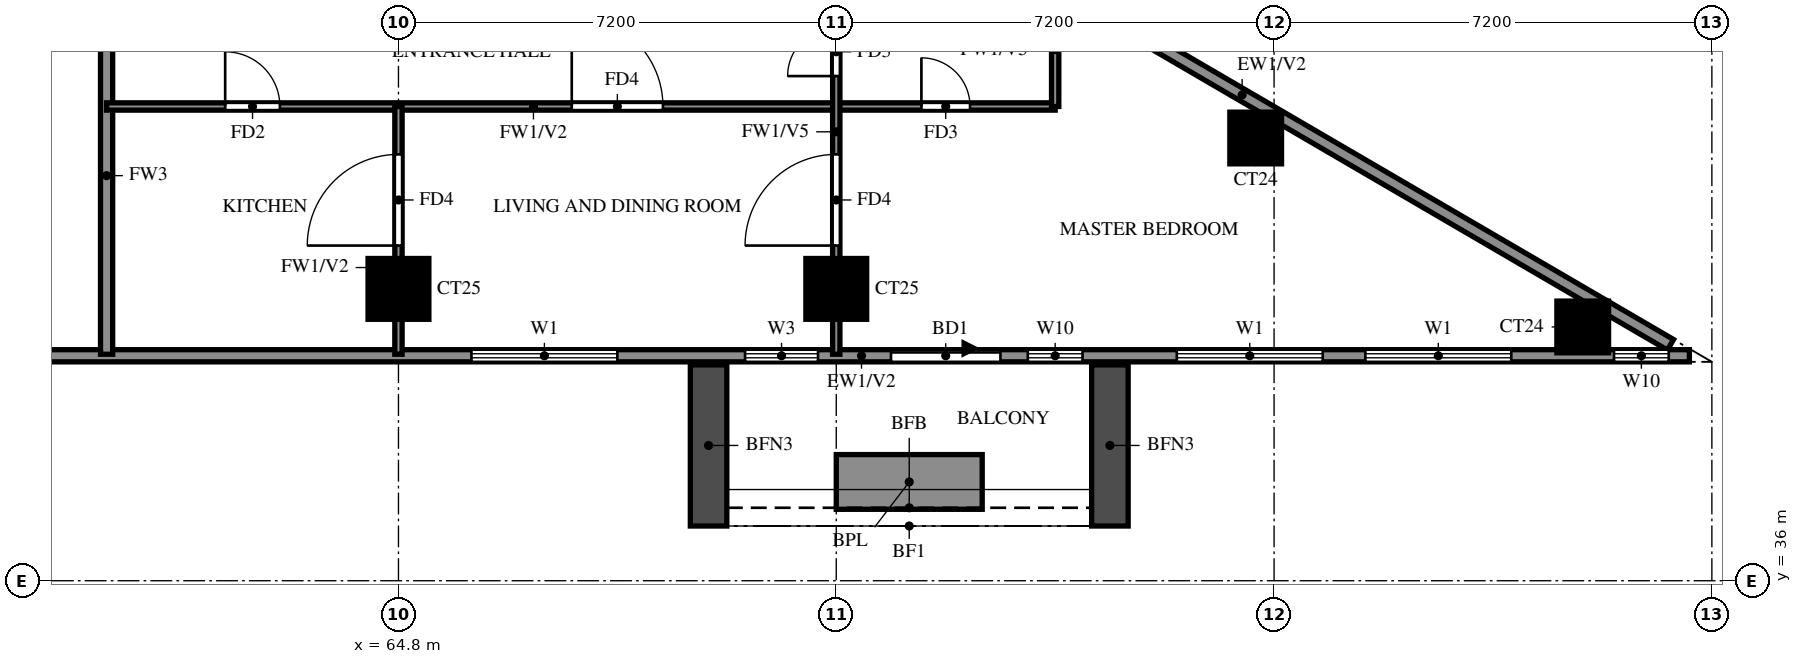
"""IFC4 building model, lengths in metres.
Left out: names, types, materials, properties, quantities, classifications, styles, units other than length and angle.
Written with IfcOpenShell. Run it as: python <this file> out.ifc"""

import sys

from ifc_helpers import new_model, si_unit, direction, frame, frame_2d, origin, origin_2d, place, context, subcontext, project, spatial, rectangle, extrude, source, transform, mapped, element, fill, save


model = new_model("IFC4")
c1 = context("Model", 3, precision=1e-05, world=origin(), true_north=direction((0.0, 1.0)))
c2 = subcontext(c1, "Body", "Model", "MODEL_VIEW")
j1 = project(units=[si_unit("LENGTHUNIT", "METRE"), si_unit("PLANEANGLEUNIT", "RADIAN")], contexts=[c1])
p1 = place(None, origin())
s1 = spatial("IfcSite", under=j1, at=p1, CompositionType="ELEMENT")
p2 = place(p1, origin())
s2 = spatial("IfcBuilding", under=s1, at=p2, CompositionType="ELEMENT")
p3 = place(p2, frame((0.0, 0.0, 146.5)))
s3 = spatial("IfcBuildingStorey", under=s2, at=p3, CompositionType="ELEMENT", Elevation=146.5)
m1 = source(origin(), c2, "Body", "SweptSolid", [
    extrude(rectangle(XDim=0.85, YDim=0.85, at=origin_2d()), origin(), (0.0, 0.0, 1.0), 3.2),
])
p4 = place(p3, frame((84.276, 40.174, 0.0), z_axis=(0.0, 0.0, 1.0), x_axis=(1.0, 0.0, 0.0)))
e1 = element("IfcColumn", 1, at=p4, inside=s3, PredefinedType="COLUMN", context=c2, shape_type="MappedRepresentation", body=[
    mapped(m1, transform((0.0, 0.0, 0.0))),
])
m2 = source(origin(), c2, "Body", "SweptSolid", [
    extrude(rectangle(XDim=1.0, YDim=1.0, at=origin_2d()), origin(), (0.0, 0.0, 1.0), 3.2),
])
for number, where, z_axis, x_axis in (
    (2, (64.8, 40.8, 0.0), (0.0, 0.0, 1.0), (1.0, 0.0, 0.0)),
    (3, (72.0, 40.8, 0.0), (0.0, 0.0, 1.0), (1.0, 0.0, 0.0)),
):
    element("IfcColumn", number, at=place(p3, frame(where, z_axis=z_axis, x_axis=x_axis)), inside=s3, PredefinedType="COLUMN", context=c2, shape_type="MappedRepresentation", body=[
        mapped(m2, transform((0.0, 0.0, 0.0))),
    ])
p5 = place(p3, frame((78.898, 43.282, 0.0), z_axis=(0.0, 0.0, 1.0), x_axis=(1.0, 0.0, 0.0)))
e4 = element("IfcColumn", 4, at=p5, inside=s3, PredefinedType="COLUMN", context=c2, shape_type="MappedRepresentation", body=[
    mapped(m1, transform((0.0, 0.0, 0.0))),
])
p6 = place(p3, frame((85.719, 39.881, 0.0), z_axis=(0.0, 0.0, 1.0), x_axis=(-0.86377618652, 0.503875678716, 0.0)))
e5 = element("IfcWall", 5, at=p6, inside=s3, PredefinedType="SOLIDWALL", context=c2, shape_type="SweptSolid", body=[
    extrude(rectangle(XDim=16.311, YDim=0.2, at=frame_2d((8.156, 0.0))), origin(), (0.0, 0.0, 1.0), 3.2),
])
p7 = place(p6, frame((13.326, 0.0, 1.5)))
e6 = element("IfcOpeningElement", 6, at=p7, cuts=e5, PredefinedType="OPENING", context=c2, shape_type="SweptSolid", body=[
    extrude(rectangle(XDim=0.9, YDim=0.9, at=frame_2d((0.45, 0.45))), frame((0.0, 0.11, 0.0), z_axis=(0.0, -1.0, 0.0), x_axis=(1.0, 0.0, 0.0)), (0.0, 0.0, 1.0), 0.22),
])
p8 = place(p3, frame((58.8, 39.7, 0.0), z_axis=(0.0, 0.0, 1.0), x_axis=(1.0, 0.0, 0.0)))
e7 = element("IfcWall", 7, at=p8, inside=s3, PredefinedType="SOLIDWALL", context=c2, shape_type="SweptSolid", body=[
    extrude(rectangle(XDim=27.23, YDim=0.2, at=frame_2d((13.615, 0.0))), origin(), (0.0, 0.0, 1.0), 3.2),
])
p9 = place(p8, frame((14.1, 0.0, 0.0)))
e8 = element("IfcOpeningElement", 8, at=p9, cuts=e7, PredefinedType="OPENING", context=c2, shape_type="SweptSolid", body=[
    extrude(rectangle(XDim=1.8, YDim=2.4, at=frame_2d((0.9, 1.2))), frame((0.0, 0.11, 0.0), z_axis=(0.0, -1.0, 0.0), x_axis=(1.0, 0.0, 0.0)), (0.0, 0.0, 1.0), 0.22),
])
p10 = place(p8, frame((7.2, 0.0, 0.6)))
e9 = element("IfcOpeningElement", 9, at=p10, cuts=e7, PredefinedType="OPENING", context=c2, shape_type="SweptSolid", body=[
    extrude(rectangle(XDim=2.4, YDim=2.4, at=frame_2d((1.2, 1.2))), frame((0.0, 0.11, 0.0), z_axis=(0.0, -1.0, 0.0), x_axis=(1.0, 0.0, 0.0)), (0.0, 0.0, 1.0), 0.22),
])
p11 = place(p8, frame((11.7, 0.0, 0.6)))
e10 = element("IfcOpeningElement", 10, at=p11, cuts=e7, PredefinedType="OPENING", context=c2, shape_type="SweptSolid", body=[
    extrude(rectangle(XDim=1.2, YDim=2.4, at=frame_2d((0.6, 1.2))), frame((0.0, 0.11, 0.0), z_axis=(0.0, -1.0, 0.0), x_axis=(1.0, 0.0, 0.0)), (0.0, 0.0, 1.0), 0.22),
])
p12 = place(p8, frame((16.35, 0.0, 0.6)))
e11 = element("IfcOpeningElement", 11, at=p12, cuts=e7, PredefinedType="OPENING", context=c2, shape_type="SweptSolid", body=[
    extrude(rectangle(XDim=0.9, YDim=2.4, at=frame_2d((0.45, 1.2))), frame((0.0, 0.11, 0.0), z_axis=(0.0, -1.0, 0.0), x_axis=(1.0, 0.0, 0.0)), (0.0, 0.0, 1.0), 0.22),
])
p13 = place(p8, frame((18.8, 0.0, 0.6)))
e12 = element("IfcOpeningElement", 12, at=p13, cuts=e7, PredefinedType="OPENING", context=c2, shape_type="SweptSolid", body=[
    extrude(rectangle(XDim=2.4, YDim=2.4, at=frame_2d((1.2, 1.2))), frame((0.0, 0.11, 0.0), z_axis=(0.0, -1.0, 0.0), x_axis=(1.0, 0.0, 0.0)), (0.0, 0.0, 1.0), 0.22),
])
p14 = place(p8, frame((21.901, 0.0, 0.6)))
e13 = element("IfcOpeningElement", 13, at=p14, cuts=e7, PredefinedType="OPENING", context=c2, shape_type="SweptSolid", body=[
    extrude(rectangle(XDim=2.4, YDim=2.4, at=frame_2d((1.2, 1.2))), frame((0.0, 0.11, 0.0), z_axis=(0.0, -1.0, 0.0), x_axis=(1.0, 0.0, 0.0)), (0.0, 0.0, 1.0), 0.22),
])
p15 = place(p8, frame((25.99, 0.0, 0.6)))
e14 = element("IfcOpeningElement", 14, at=p15, cuts=e7, PredefinedType="OPENING", context=c2, shape_type="SweptSolid", body=[
    extrude(rectangle(XDim=0.9, YDim=2.4, at=frame_2d((0.45, 1.2))), frame((0.0, 0.11, 0.0), z_axis=(0.0, -1.0, 0.0), x_axis=(1.0, 0.0, 0.0)), (0.0, 0.0, 1.0), 0.22),
])
for number, where, z_axis, x_axis in (
    (15, (69.9, 39.55, 0.0), (0.0, 0.0, 1.0), (0.0, -1.0, 0.0)),
    (16, (76.5, 39.55, 0.0), (0.0, 0.0, 1.0), (0.0, -1.0, 0.0)),
):
    element("IfcWall", number, at=place(p3, frame(where, z_axis=z_axis, x_axis=x_axis)), inside=s3, PredefinedType="SOLIDWALL", context=c2, shape_type="SweptSolid", body=[
        extrude(rectangle(XDim=2.65, YDim=0.6, at=frame_2d((1.325, 0.0))), origin(), (0.0, 0.0, 1.0), 2.85),
    ])
p16 = place(p3, frame((72.0, 37.625, 0.0), z_axis=(0.0, 0.0, 1.0), x_axis=(1.0, 0.0, 0.0)))
e17 = element("IfcWall", 17, at=p16, inside=s3, PredefinedType="SOLIDWALL", context=c2, shape_type="SweptSolid", body=[
    extrude(rectangle(XDim=2.4, YDim=0.9, at=frame_2d((1.2, 0.0))), origin(), (0.0, 0.0, 1.0), 0.9),
])
p17 = place(p3, frame((60.0, 39.725, 0.0), z_axis=(0.0, 0.0, 1.0), x_axis=(0.0, 1.0, 0.0)))
e18 = element("IfcWall", 18, at=p17, inside=s3, PredefinedType="SOLIDWALL", context=c2, shape_type="SweptSolid", body=[
    extrude(rectangle(XDim=5.875, YDim=0.2, at=frame_2d((2.938, 0.0))), origin(), (0.0, 0.0, 1.0), 3.2),
])
p18 = place(p3, frame((60.0, 43.8, 0.0), z_axis=(0.0, 0.0, 1.0), x_axis=(1.0, 0.0, 0.0)))
e19 = element("IfcWall", 19, at=p18, inside=s3, PredefinedType="PARTITIONING", context=c2, shape_type="SweptSolid", body=[
    extrude(rectangle(XDim=15.6, YDim=0.12, at=frame_2d((7.8, 0.0))), origin(), (0.0, 0.0, 1.0), 3.2),
])
p19 = place(p18, frame((7.65, 0.0, 0.0)))
e20 = element("IfcOpeningElement", 20, at=p19, cuts=e19, PredefinedType="OPENING", context=c2, shape_type="SweptSolid", body=[
    extrude(rectangle(XDim=1.5, YDim=2.1, at=frame_2d((0.75, 1.05))), frame((0.0, 0.07, 0.0), z_axis=(0.0, -1.0, 0.0), x_axis=(1.0, 0.0, 0.0)), (0.0, 0.0, 1.0), 0.14),
])
p20 = place(p18, frame((1.95, 0.0, 0.0)))
e21 = element("IfcOpeningElement", 21, at=p20, cuts=e19, PredefinedType="OPENING", context=c2, shape_type="SweptSolid", body=[
    extrude(rectangle(XDim=0.9, YDim=2.1, at=frame_2d((0.45, 1.05))), frame((0.0, 0.07, 0.0), z_axis=(0.0, -1.0, 0.0), x_axis=(1.0, 0.0, 0.0)), (0.0, 0.0, 1.0), 0.14),
])
p21 = place(p18, frame((13.4, 0.0, 0.0)))
e22 = element("IfcOpeningElement", 22, at=p21, cuts=e19, PredefinedType="OPENING", context=c2, shape_type="SweptSolid", body=[
    extrude(rectangle(XDim=0.8, YDim=2.1, at=frame_2d((0.4, 1.05))), frame((0.0, 0.07, 0.0), z_axis=(0.0, -1.0, 0.0), x_axis=(1.0, 0.0, 0.0)), (0.0, 0.0, 1.0), 0.14),
])
p22 = place(p3, frame((64.8, 39.725, 0.0), z_axis=(0.0, 0.0, 1.0), x_axis=(0.0, 1.0, 0.0)))
e23 = element("IfcWall", 23, at=p22, inside=s3, PredefinedType="PARTITIONING", context=c2, shape_type="SweptSolid", body=[
    extrude(rectangle(XDim=4.075, YDim=0.12, at=frame_2d((2.038, 0.0))), origin(), (0.0, 0.0, 1.0), 3.2),
])
p23 = place(p22, frame((1.788, 0.0, 0.0)))
e24 = element("IfcOpeningElement", 24, at=p23, cuts=e23, PredefinedType="OPENING", context=c2, shape_type="SweptSolid", body=[
    extrude(rectangle(XDim=1.5, YDim=2.1, at=frame_2d((0.75, 1.05))), frame((0.0, 0.07, 0.0), z_axis=(0.0, -1.0, 0.0), x_axis=(1.0, 0.0, 0.0)), (0.0, 0.0, 1.0), 0.14),
])
p24 = place(p3, frame((72.0, 39.725, 0.0), z_axis=(0.0, 0.0, 1.0), x_axis=(0.0, 1.0, 0.0)))
e25 = element("IfcWall", 25, at=p24, inside=s3, PredefinedType="PARTITIONING", context=c2, shape_type="SweptSolid", body=[
    extrude(rectangle(XDim=8.13, YDim=0.12, at=frame_2d((4.065, 0.0))), origin(), (0.0, 0.0, 1.0), 2.3),
])
p25 = place(p24, frame((1.788, 0.0, 0.0)))
e26 = element("IfcOpeningElement", 26, at=p25, cuts=e25, PredefinedType="OPENING", context=c2, shape_type="SweptSolid", body=[
    extrude(rectangle(XDim=1.5, YDim=2.1, at=frame_2d((0.75, 1.05))), frame((0.0, 0.07, 0.0), z_axis=(0.0, -1.0, 0.0), x_axis=(1.0, 0.0, 0.0)), (0.0, 0.0, 1.0), 0.14),
])
p26 = place(p24, frame((4.575, 0.0, 0.0)))
e27 = element("IfcOpeningElement", 27, at=p26, cuts=e25, PredefinedType="OPENING", context=c2, shape_type="SweptSolid", body=[
    extrude(rectangle(XDim=0.8, YDim=2.1, at=frame_2d((0.4, 1.05))), frame((0.0, 0.07, 0.0), z_axis=(0.0, -1.0, 0.0), x_axis=(1.0, 0.0, 0.0)), (0.0, 0.0, 1.0), 0.14),
])
p27 = place(p3, frame((75.6, 43.8, 0.0), z_axis=(0.0, 0.0, 1.0), x_axis=(0.0, 1.0, 0.0)))
e28 = element("IfcWall", 28, at=p27, inside=s3, PredefinedType="PARTITIONING", context=c2, shape_type="SweptSolid", body=[
    extrude(rectangle(XDim=1.868, YDim=0.12, at=frame_2d((0.934, 0.0))), origin(), (0.0, 0.0, 1.0), 2.3),
])
p28 = place(p9, origin())
e29 = element("IfcDoor", 29, at=p28, inside=s3, OperationType="DOUBLE_DOOR_SLIDING", PredefinedType="DOOR", context=c2, shape_type="SweptSolid", body=[
    extrude(rectangle(XDim=1.8, YDim=2.4, at=frame_2d((0.9, 1.2))), frame((0.0, 0.025, 0.0), z_axis=(0.0, -1.0, 0.0), x_axis=(1.0, 0.0, 0.0)), (0.0, 0.0, 1.0), 0.05),
])
fill(e8, e29)
p29 = place(p10, origin())
e30 = element("IfcWindow", 30, at=p29, inside=s3, PartitioningType="DOUBLE_PANEL_VERTICAL", PredefinedType="WINDOW", context=c2, shape_type="SweptSolid", body=[
    extrude(rectangle(XDim=2.4, YDim=2.4, at=frame_2d((1.2, 1.2))), frame((0.0, 0.03, 0.0), z_axis=(0.0, -1.0, 0.0), x_axis=(1.0, 0.0, 0.0)), (0.0, 0.0, 1.0), 0.06),
])
fill(e9, e30)
p30 = place(p11, origin())
e31 = element("IfcWindow", 31, at=p30, inside=s3, PartitioningType="SINGLE_PANEL", PredefinedType="WINDOW", context=c2, shape_type="SweptSolid", body=[
    extrude(rectangle(XDim=1.2, YDim=2.4, at=frame_2d((0.6, 1.2))), frame((0.0, 0.03, 0.0), z_axis=(0.0, -1.0, 0.0), x_axis=(1.0, 0.0, 0.0)), (0.0, 0.0, 1.0), 0.06),
])
fill(e10, e31)
p31 = place(p12, origin())
e32 = element("IfcWindow", 32, at=p31, inside=s3, PartitioningType="SINGLE_PANEL", PredefinedType="WINDOW", context=c2, shape_type="SweptSolid", body=[
    extrude(rectangle(XDim=0.9, YDim=2.4, at=frame_2d((0.45, 1.2))), frame((0.0, 0.03, 0.0), z_axis=(0.0, -1.0, 0.0), x_axis=(1.0, 0.0, 0.0)), (0.0, 0.0, 1.0), 0.06),
])
fill(e11, e32)
p32 = place(p13, origin())
e33 = element("IfcWindow", 33, at=p32, inside=s3, PartitioningType="DOUBLE_PANEL_VERTICAL", PredefinedType="WINDOW", context=c2, shape_type="SweptSolid", body=[
    extrude(rectangle(XDim=2.4, YDim=2.4, at=frame_2d((1.2, 1.2))), frame((0.0, 0.03, 0.0), z_axis=(0.0, -1.0, 0.0), x_axis=(1.0, 0.0, 0.0)), (0.0, 0.0, 1.0), 0.06),
])
fill(e12, e33)
p33 = place(p14, origin())
e34 = element("IfcWindow", 34, at=p33, inside=s3, PartitioningType="DOUBLE_PANEL_VERTICAL", PredefinedType="WINDOW", context=c2, shape_type="SweptSolid", body=[
    extrude(rectangle(XDim=2.4, YDim=2.4, at=frame_2d((1.2, 1.2))), frame((0.0, 0.03, 0.0), z_axis=(0.0, -1.0, 0.0), x_axis=(1.0, 0.0, 0.0)), (0.0, 0.0, 1.0), 0.06),
])
fill(e13, e34)
p34 = place(p15, origin())
e35 = element("IfcWindow", 35, at=p34, inside=s3, PartitioningType="SINGLE_PANEL", PredefinedType="WINDOW", context=c2, shape_type="SweptSolid", body=[
    extrude(rectangle(XDim=0.9, YDim=2.4, at=frame_2d((0.45, 1.2))), frame((0.0, 0.03, 0.0), z_axis=(0.0, -1.0, 0.0), x_axis=(1.0, 0.0, 0.0)), (0.0, 0.0, 1.0), 0.06),
])
fill(e14, e35)
p35 = place(p23, origin())
e36 = element("IfcDoor", 36, at=p35, inside=s3, OperationType="SINGLE_SWING_LEFT", PredefinedType="DOOR", context=c2, shape_type="SweptSolid", body=[
    extrude(rectangle(XDim=1.5, YDim=2.1, at=frame_2d((0.75, 1.05))), frame((0.0, 0.025, 0.0), z_axis=(0.0, -1.0, 0.0), x_axis=(1.0, 0.0, 0.0)), (0.0, 0.0, 1.0), 0.05),
])
fill(e24, e36)
p36 = place(p19, origin())
e37 = element("IfcDoor", 37, at=p36, inside=s3, OperationType="SINGLE_SWING_RIGHT", PredefinedType="DOOR", context=c2, shape_type="SweptSolid", body=[
    extrude(rectangle(XDim=1.5, YDim=2.1, at=frame_2d((0.75, 1.05))), frame((0.0, 0.025, 0.0), z_axis=(0.0, -1.0, 0.0), x_axis=(1.0, 0.0, 0.0)), (0.0, 0.0, 1.0), 0.05),
])
fill(e20, e37)
p37 = place(p20, origin())
e38 = element("IfcDoor", 38, at=p37, inside=s3, OperationType="SINGLE_SWING_LEFT", PredefinedType="DOOR", context=c2, shape_type="SweptSolid", body=[
    extrude(rectangle(XDim=0.9, YDim=2.1, at=frame_2d((0.45, 1.05))), frame((0.0, 0.025, 0.0), z_axis=(0.0, -1.0, 0.0), x_axis=(1.0, 0.0, 0.0)), (0.0, 0.0, 1.0), 0.05),
])
fill(e21, e38)
p38 = place(p25, origin())
e39 = element("IfcDoor", 39, at=p38, inside=s3, OperationType="SINGLE_SWING_RIGHT", PredefinedType="DOOR", context=c2, shape_type="SweptSolid", body=[
    extrude(rectangle(XDim=1.5, YDim=2.1, at=frame_2d((0.75, 1.05))), frame((0.0, 0.025, 0.0), z_axis=(0.0, -1.0, 0.0), x_axis=(1.0, 0.0, 0.0)), (0.0, 0.0, 1.0), 0.05),
])
fill(e26, e39)
p39 = place(p26, origin())
e40 = element("IfcDoor", 40, at=p39, inside=s3, OperationType="SINGLE_SWING_RIGHT", PredefinedType="DOOR", context=c2, shape_type="SweptSolid", body=[
    extrude(rectangle(XDim=0.8, YDim=2.1, at=frame_2d((0.4, 1.05))), frame((0.0, 0.025, 0.0), z_axis=(0.0, -1.0, 0.0), x_axis=(1.0, 0.0, 0.0)), (0.0, 0.0, 1.0), 0.05),
])
fill(e27, e40)
p40 = place(p21, origin())
e41 = element("IfcDoor", 41, at=p40, inside=s3, OperationType="SINGLE_SWING_LEFT", PredefinedType="DOOR", context=c2, shape_type="SweptSolid", body=[
    extrude(rectangle(XDim=0.8, YDim=2.1, at=frame_2d((0.4, 1.05))), frame((0.0, 0.025, 0.0), z_axis=(0.0, -1.0, 0.0), x_axis=(1.0, 0.0, 0.0)), (0.0, 0.0, 1.0), 0.05),
])
fill(e22, e41)
save(model, sys.argv[1])
